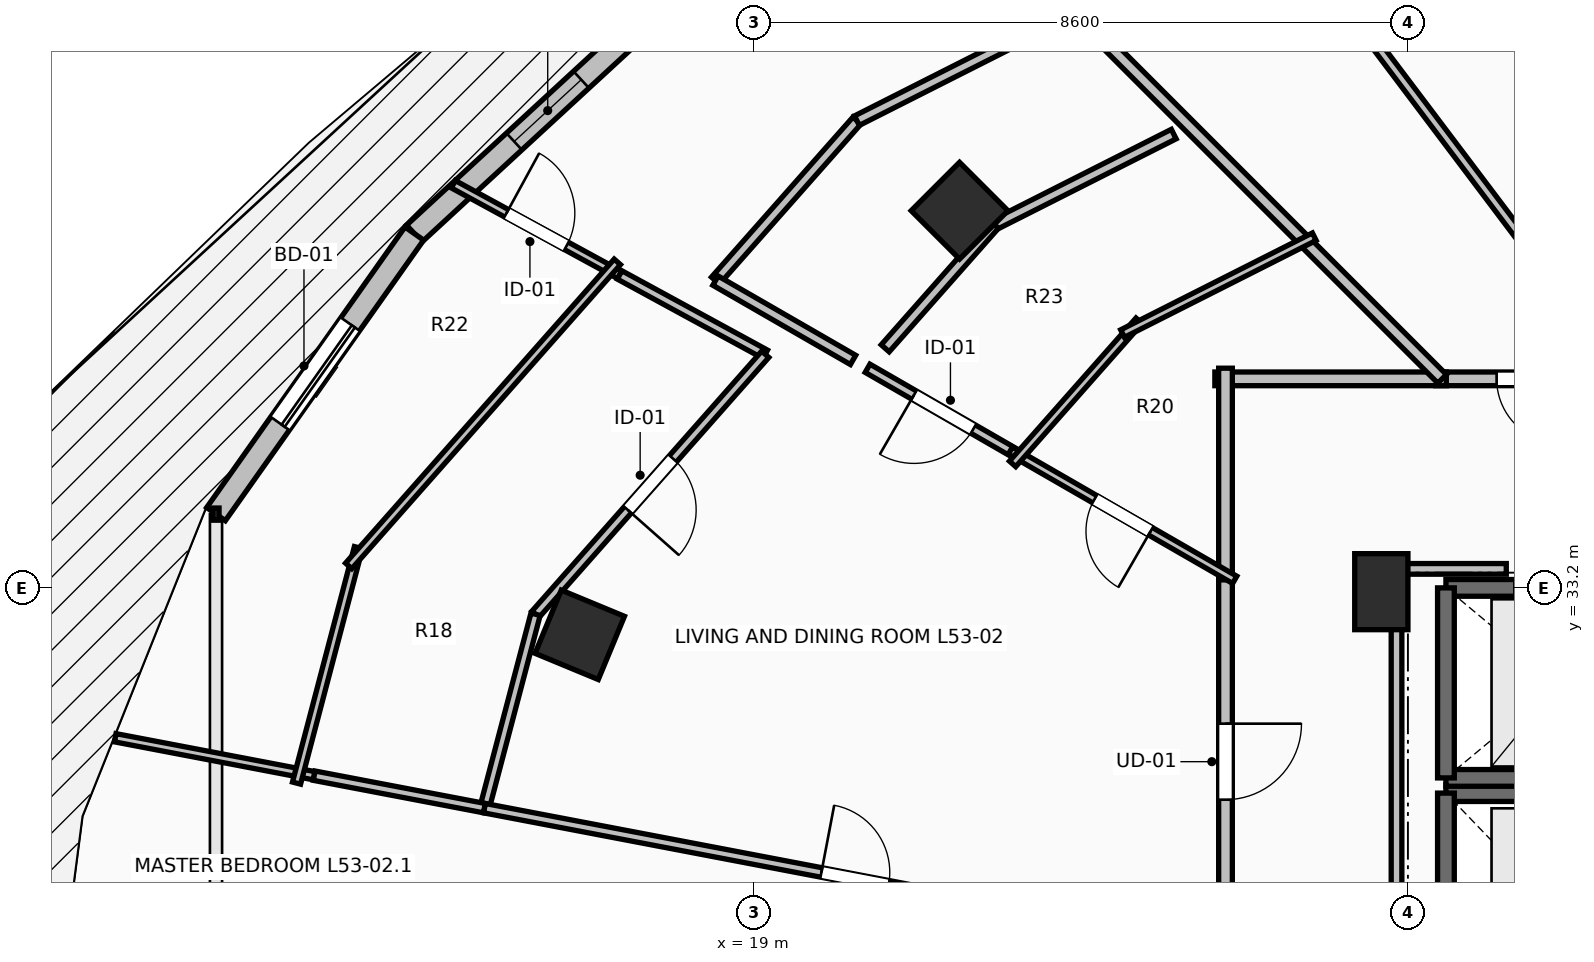
"""IFC4 building model, lengths in metres.
Left out: names, types, materials, properties, quantities, classifications, styles, units other than length and angle.
Written with IfcOpenShell. Run it as: python <this file> out.ifc"""

import sys

from ifc_helpers import new_model, si_unit, direction, frame, frame_2d, origin, origin_2d, place, context, subcontext, project, spatial, rectangle, extrude, element, fill, save


model = new_model("IFC4")
c1 = context("Model", 3, precision=1e-05, world=origin(), true_north=direction((0.0, 1.0)))
c2 = subcontext(c1, "Body", "Model", "MODEL_VIEW")
j1 = project(units=[si_unit("LENGTHUNIT", "METRE"), si_unit("PLANEANGLEUNIT", "RADIAN")], contexts=[c1])
p1 = place(None, origin())
s1 = spatial("IfcSite", under=j1, at=p1, CompositionType="ELEMENT")
p2 = place(p1, origin())
s2 = spatial("IfcBuilding", under=s1, at=p2, CompositionType="ELEMENT")
p3 = place(p2, frame((0.0, 0.0, 196.6)))
s3 = spatial("IfcBuildingStorey", under=s2, at=p3, CompositionType="ELEMENT", Elevation=196.6)
for number, where, z_axis, x_axis in (
    (1, (21.701, 38.162, 0.0), (0.0, 0.0, 1.0), (-0.707, 0.707, 0.0)),
    (2, (16.705, 32.582, 0.0), (0.0, 0.0, 1.0), (-0.924, 0.383, 0.0)),
):
    element("IfcColumn", number, at=place(p3, frame(where, z_axis=z_axis, x_axis=x_axis)), inside=s3, PredefinedType="COLUMN", context=c2, shape_type="SweptSolid", body=[
        extrude(rectangle(XDim=0.9, YDim=0.9, at=origin_2d()), origin(), (0.0, 0.0, 1.0), 3.5),
    ])
p4 = place(p3, frame((27.25, 33.15, 0.0), z_axis=(0.0, 0.0, 1.0), x_axis=(1.0, 0.0, 0.0)))
e3 = element("IfcColumn", 3, at=p4, inside=s3, PredefinedType="PILASTER", context=c2, shape_type="SweptSolid", body=[
    extrude(rectangle(XDim=0.7, YDim=1.0, at=origin_2d()), origin(), (0.0, 0.0, 1.0), 3.5),
])
p5 = place(p3, frame((18.038, 41.097, 0.0), z_axis=(0.0, 0.0, 1.0), x_axis=(-0.735359993374, -0.677676678177, 0.0)))
e4 = element("IfcWall", 4, at=p5, inside=s3, PredefinedType="STANDARD", context=c2, shape_type="SweptSolid", body=[
    extrude(rectangle(XDim=4.774, YDim=0.3, at=frame_2d((2.387, 0.0))), origin(), (0.0, 0.0, 1.0), 3.24),
])
p6 = place(p5, frame((1.787, 0.0, 0.85)))
e5 = element("IfcOpeningElement", 5, at=p6, cuts=e4, PredefinedType="OPENING", context=c2, shape_type="SweptSolid", body=[
    extrude(rectangle(XDim=1.2, YDim=2.1, at=frame_2d((0.6, 1.05))), frame((0.0, 0.165, 0.0), z_axis=(0.0, -1.0, 0.0), x_axis=(1.0, 0.0, 0.0)), (0.0, 0.0, 1.0), 0.33),
])
p7 = place(p3, frame((14.528, 37.861, 0.0), z_axis=(0.0, 0.0, 1.0), x_axis=(-0.577168747264, -0.81662490605, 0.0)))
e6 = element("IfcWall", 6, at=p7, inside=s3, PredefinedType="STANDARD", context=c2, shape_type="SweptSolid", body=[
    extrude(rectangle(XDim=4.52, YDim=0.3, at=frame_2d((2.26, 0.0))), origin(), (0.0, 0.0, 1.0), 3.24),
])
p8 = place(p7, frame((1.46, 0.0, 0.0)))
e7 = element("IfcOpeningElement", 7, at=p8, cuts=e6, PredefinedType="OPENING", context=c2, shape_type="SweptSolid", body=[
    extrude(rectangle(XDim=1.6, YDim=2.3, at=frame_2d((0.8, 1.15))), frame((0.0, 0.165, 0.0), z_axis=(0.0, -1.0, 0.0), x_axis=(1.0, 0.0, 0.0)), (0.0, 0.0, 1.0), 0.33),
])
p9 = place(p3, frame((30.5, 30.5, 0.0), z_axis=(0.0, 0.0, 1.0), x_axis=(-1.0, 0.0, 0.0)))
e8 = element("IfcWall", 8, at=p9, inside=s3, PredefinedType="SHEAR", context=c2, shape_type="SweptSolid", body=[
    extrude(rectangle(XDim=2.4, YDim=0.22, at=frame_2d((1.2, 0.0))), origin(), (0.0, 0.0, 1.0), 3.24),
])
p10 = place(p3, frame((28.1, 30.5, 0.0), z_axis=(0.0, 0.0, 1.0), x_axis=(0.0, -1.0, 0.0)))
e9 = element("IfcWall", 9, at=p10, inside=s3, PredefinedType="SHEAR", context=c2, shape_type="SweptSolid", body=[
    extrude(rectangle(XDim=2.5, YDim=0.22, at=frame_2d((1.25, 0.0))), origin(), (0.0, 0.0, 1.0), 3.24),
])
p11 = place(p3, frame((28.1, 30.7, 0.0), z_axis=(0.0, 0.0, 1.0), x_axis=(1.0, 0.0, 0.0)))
e10 = element("IfcWall", 10, at=p11, inside=s3, PredefinedType="SOLIDWALL", context=c2, shape_type="SweptSolid", body=[
    extrude(rectangle(XDim=3.0, YDim=0.22, at=frame_2d((1.5, 0.0))), origin(), (0.0, 0.0, 1.0), 3.24),
])
p12 = place(p3, frame((31.1, 33.2, 0.0), z_axis=(0.0, 0.0, 1.0), x_axis=(-1.0, 0.0, 0.0)))
e11 = element("IfcWall", 11, at=p12, inside=s3, PredefinedType="SOLIDWALL", context=c2, shape_type="SweptSolid", body=[
    extrude(rectangle(XDim=3.0, YDim=0.22, at=frame_2d((1.5, 0.0))), origin(), (0.0, 0.0, 1.0), 3.24),
])
p13 = place(p12, frame((0.9, 0.0, 0.0)))
e12 = element("IfcOpeningElement", 12, at=p13, cuts=e11, PredefinedType="OPENING", context=c2, shape_type="SweptSolid", body=[
    extrude(rectangle(XDim=1.2, YDim=2.2, at=frame_2d((0.6, 1.1))), frame((0.0, 0.125, 0.0), z_axis=(0.0, -1.0, 0.0), x_axis=(1.0, 0.0, 0.0)), (0.0, 0.0, 1.0), 0.25),
])
p14 = place(p3, frame((28.1, 33.2, 0.0), z_axis=(0.0, 0.0, 1.0), x_axis=(0.0, -1.0, 0.0)))
e13 = element("IfcWall", 13, at=p14, inside=s3, PredefinedType="SOLIDWALL", context=c2, shape_type="SweptSolid", body=[
    extrude(rectangle(XDim=2.5, YDim=0.22, at=frame_2d((1.25, 0.0))), origin(), (0.0, 0.0, 1.0), 3.24),
])
p15 = place(p3, frame((30.419, 35.95, 0.0), z_axis=(0.0, 0.0, 1.0), x_axis=(-1.0, 0.0, 0.0)))
e14 = element("IfcWall", 14, at=p15, inside=s3, PredefinedType="PARTITIONING", context=c2, shape_type="SweptSolid", body=[
    extrude(rectangle(XDim=2.454, YDim=0.18, at=frame_2d((1.227, 0.0))), origin(), (0.0, 0.0, 1.0), 2.432),
])
p16 = place(p15, frame((0.802, 0.0, 0.0)))
e15 = element("IfcOpeningElement", 15, at=p16, cuts=e14, PredefinedType="OPENING", context=c2, shape_type="SweptSolid", body=[
    extrude(rectangle(XDim=0.85, YDim=2.1, at=frame_2d((0.425, 1.05))), frame((0.0, 0.105, 0.0), z_axis=(0.0, -1.0, 0.0), x_axis=(1.0, 0.0, 0.0)), (0.0, 0.0, 1.0), 0.21),
])
p17 = place(p3, frame((25.2, 33.445, 0.0), z_axis=(0.0, 0.0, 1.0), x_axis=(0.0, -1.0, 0.0)))
e16 = element("IfcWall", 16, at=p17, inside=s3, PredefinedType="PARTITIONING", context=c2, shape_type="SweptSolid", body=[
    extrude(rectangle(XDim=5.063, YDim=0.18, at=frame_2d((2.531, 0.0))), origin(), (0.0, 0.0, 1.0), 2.432),
])
p18 = place(p17, frame((2.031, 0.0, 0.0)))
e17 = element("IfcOpeningElement", 17, at=p18, cuts=e16, PredefinedType="OPENING", context=c2, shape_type="SweptSolid", body=[
    extrude(rectangle(XDim=1.0, YDim=2.15, at=frame_2d((0.5, 1.075))), frame((0.0, 0.105, 0.0), z_axis=(0.0, -1.0, 0.0), x_axis=(1.0, 0.0, 0.0)), (0.0, 0.0, 1.0), 0.21),
])
p19 = place(p3, frame((28.105, 35.95, 0.0), z_axis=(0.0, 0.0, 1.0), x_axis=(-1.0, 0.0, 0.0)))
e18 = element("IfcWall", 18, at=p19, inside=s3, PredefinedType="PARTITIONING", context=c2, shape_type="SweptSolid", body=[
    extrude(rectangle(XDim=3.045, YDim=0.18, at=frame_2d((1.522, 0.0))), origin(), (0.0, 0.0, 1.0), 2.432),
])
p20 = place(p3, frame((25.2, 36.09, 0.0), z_axis=(0.0, 0.0, 1.0), x_axis=(0.0, -1.0, 0.0)))
e19 = element("IfcWall", 19, at=p20, inside=s3, PredefinedType="PARTITIONING", context=c2, shape_type="SweptSolid", body=[
    extrude(rectangle(XDim=2.785, YDim=0.18, at=frame_2d((1.393, 0.0))), origin(), (0.0, 0.0, 1.0), 2.432),
])
p21 = place(p3, frame((27.069, 45.673, 0.0), z_axis=(0.0, 0.0, 1.0), x_axis=(0.485717471054, -0.874115860921, 0.0)))
e20 = element("IfcWall", 20, at=p21, inside=s3, PredefinedType="PARTITIONING", context=c2, shape_type="SweptSolid", body=[
    extrude(rectangle(XDim=11.123, YDim=0.125, at=frame_2d((5.562, 0.0))), origin(), (0.0, 0.0, 1.0), 2.432),
])
p22 = place(p3, frame((24.075, 44.46, 0.0), z_axis=(0.0, 0.0, 1.0), x_axis=(0.602185523072, -0.798356183544, 0.0)))
e21 = element("IfcWall", 21, at=p22, inside=s3, PredefinedType="PARTITIONING", context=c2, shape_type="SweptSolid", body=[
    extrude(rectangle(XDim=10.659, YDim=0.125, at=frame_2d((5.33, 0.0))), origin(), (0.0, 0.0, 1.0), 2.432),
])
p23 = place(p3, frame((21.041, 42.959, 0.0), z_axis=(0.0, 0.0, 1.0), x_axis=(0.707106781187, -0.707106781187, 0.0)))
e22 = element("IfcWall", 22, at=p23, inside=s3, PredefinedType="PARTITIONING", context=c2, shape_type="SweptSolid", body=[
    extrude(rectangle(XDim=9.912, YDim=0.16, at=frame_2d((4.956, 0.0))), origin(), (0.0, 0.0, 1.0), 2.432),
])
p24 = place(p3, frame((22.492, 34.936, 0.0), z_axis=(0.0, 0.0, 1.0), x_axis=(-0.866435390844, 0.499289208267, 0.0)))
e23 = element("IfcWall", 23, at=p24, inside=s3, PredefinedType="PARTITIONING", context=c2, shape_type="SweptSolid", body=[
    extrude(rectangle(XDim=2.309, YDim=0.125, at=frame_2d((1.155, 0.0))), origin(), (0.0, 0.0, 1.0), 2.922),
])
p25 = place(p24, frame((0.705, 0.0, 0.0)))
e24 = element("IfcOpeningElement", 24, at=p25, cuts=e23, PredefinedType="OPENING", context=c2, shape_type="SweptSolid", body=[
    extrude(rectangle(XDim=0.9, YDim=2.1, at=frame_2d((0.45, 1.05))), frame((0.0, 0.077, 0.0), z_axis=(0.0, -1.0, 0.0), x_axis=(1.0, 0.0, 0.0)), (0.0, 0.0, 1.0), 0.155),
])
p26 = place(p3, frame((25.321, 33.306, 0.0), z_axis=(0.0, 0.0, 1.0), x_axis=(-0.866517217622, 0.49914718427, 0.0)))
e25 = element("IfcWall", 25, at=p26, inside=s3, PredefinedType="PARTITIONING", context=c2, shape_type="SweptSolid", body=[
    extrude(rectangle(XDim=3.405, YDim=0.11, at=frame_2d((1.703, 0.0))), origin(), (0.0, 0.0, 1.0), 2.922),
])
p27 = place(p26, frame((1.278, 0.0, 0.0)))
e26 = element("IfcOpeningElement", 26, at=p27, cuts=e25, PredefinedType="OPENING", context=c2, shape_type="SweptSolid", body=[
    extrude(rectangle(XDim=0.85, YDim=2.1, at=frame_2d((0.425, 1.05))), frame((0.0, 0.07, 0.0), z_axis=(0.0, -1.0, 0.0), x_axis=(1.0, 0.0, 0.0)), (0.0, 0.0, 1.0), 0.14),
])
p28 = place(p3, frame((15.041, 38.51, 0.0), z_axis=(0.0, 0.0, 1.0), x_axis=(0.877951724479, -0.478749171784, 0.0)))
e27 = element("IfcWall", 27, at=p28, inside=s3, PredefinedType="PARTITIONING", context=c2, shape_type="SweptSolid", body=[
    extrude(rectangle(XDim=2.492, YDim=0.11, at=frame_2d((1.246, 0.0))), origin(), (0.0, 0.0, 1.0), 3.24),
])
p29 = place(p28, frame((0.796, 0.0, 0.0)))
e28 = element("IfcOpeningElement", 28, at=p29, cuts=e27, PredefinedType="OPENING", context=c2, shape_type="SweptSolid", body=[
    extrude(rectangle(XDim=0.9, YDim=2.1, at=frame_2d((0.45, 1.05))), frame((0.0, 0.07, 0.0), z_axis=(0.0, -1.0, 0.0), x_axis=(1.0, 0.0, 0.0)), (0.0, 0.0, 1.0), 0.14),
])
p30 = place(p3, frame((13.21, 30.729, 0.0), z_axis=(0.0, 0.0, 1.0), x_axis=(-0.982266305937, 0.187491077708, 0.0)))
e29 = element("IfcWall", 29, at=p30, inside=s3, PredefinedType="PARTITIONING", context=c2, shape_type="SweptSolid", body=[
    extrude(rectangle(XDim=2.664, YDim=0.11, at=frame_2d((1.332, 0.0))), origin(), (0.0, 0.0, 1.0), 3.24),
])
p31 = place(p3, frame((17.229, 37.317, 0.0), z_axis=(0.0, 0.0, 1.0), x_axis=(0.878117834212, -0.47844442649, 0.0)))
e30 = element("IfcWall", 30, at=p31, inside=s3, PredefinedType="PARTITIONING", context=c2, shape_type="SweptSolid", body=[
    extrude(rectangle(XDim=2.182, YDim=0.125, at=frame_2d((1.091, 0.0))), origin(), (0.0, 0.0, 1.0), 3.24),
])
p32 = place(p3, frame((19.145, 36.273, 0.0), z_axis=(0.0, 0.0, 1.0), x_axis=(-0.662162868769, -0.749359950373, 0.0)))
e31 = element("IfcWall", 31, at=p32, inside=s3, PredefinedType="PARTITIONING", context=c2, shape_type="SweptSolid", body=[
    extrude(rectangle(XDim=4.564, YDim=0.125, at=frame_2d((2.282, 0.0))), origin(), (0.0, 0.0, 1.0), 3.24),
])
p33 = place(p32, frame((1.832, 0.0, 0.0)))
e32 = element("IfcOpeningElement", 32, at=p33, cuts=e31, PredefinedType="OPENING", context=c2, shape_type="SweptSolid", body=[
    extrude(rectangle(XDim=0.9, YDim=2.1, at=frame_2d((0.45, 1.05))), frame((0.0, 0.077, 0.0), z_axis=(0.0, -1.0, 0.0), x_axis=(1.0, 0.0, 0.0)), (0.0, 0.0, 1.0), 0.155),
])
p34 = place(p3, frame((16.123, 32.853, 0.0), z_axis=(0.0, 0.0, 1.0), x_axis=(-0.254775717765, -0.967000172512, 0.0)))
e33 = element("IfcWall", 33, at=p34, inside=s3, PredefinedType="PARTITIONING", context=c2, shape_type="SweptSolid", body=[
    extrude(rectangle(XDim=2.638, YDim=0.125, at=frame_2d((1.319, 0.0))), origin(), (0.0, 0.0, 1.0), 3.24),
])
p35 = place(p3, frame((15.451, 30.302, 0.0), z_axis=(0.0, 0.0, 1.0), x_axis=(-0.982295439063, 0.187338384738, 0.0)))
e34 = element("IfcWall", 34, at=p35, inside=s3, PredefinedType="PARTITIONING", context=c2, shape_type="SweptSolid", body=[
    extrude(rectangle(XDim=2.281, YDim=0.125, at=frame_2d((1.14, 0.0))), origin(), (0.0, 0.0, 1.0), 3.24),
])
p36 = place(p3, frame((15.451, 30.302, 0.0), z_axis=(0.0, 0.0, 1.0), x_axis=(0.982284698783, -0.187394691859, 0.0)))
e35 = element("IfcWall", 35, at=p36, inside=s3, PredefinedType="PARTITIONING", context=c2, shape_type="SweptSolid", body=[
    extrude(rectangle(XDim=9.925, YDim=0.125, at=frame_2d((4.962, 0.0))), origin(), (0.0, 0.0, 1.0), 2.774),
])
p37 = place(p36, frame((4.512, 0.0, 0.0)))
e36 = element("IfcOpeningElement", 36, at=p37, cuts=e35, PredefinedType="OPENING", context=c2, shape_type="SweptSolid", body=[
    extrude(rectangle(XDim=0.9, YDim=2.1, at=frame_2d((0.45, 1.05))), frame((0.0, 0.077, 0.0), z_axis=(0.0, -1.0, 0.0), x_axis=(1.0, 0.0, 0.0)), (0.0, 0.0, 1.0), 0.155),
])
p38 = place(p3, frame((22.399, 34.831, 0.0), z_axis=(0.0, 0.0, 1.0), x_axis=(0.662292938072, 0.749244996099, 0.0)))
e37 = element("IfcWall", 37, at=p38, inside=s3, PredefinedType="PARTITIONING", context=c2, shape_type="SweptSolid", body=[
    extrude(rectangle(XDim=2.513, YDim=0.11, at=frame_2d((1.256, 0.0))), origin(), (0.0, 0.0, 1.0), 2.432),
])
p39 = place(p3, frame((23.846, 36.546, 0.0), z_axis=(0.0, 0.0, 1.0), x_axis=(0.892553076465, 0.450942352959, 0.0)))
e38 = element("IfcWall", 38, at=p39, inside=s3, PredefinedType="PARTITIONING", context=c2, shape_type="SweptSolid", body=[
    extrude(rectangle(XDim=2.826, YDim=0.11, at=frame_2d((1.413, 0.0))), origin(), (0.0, 0.0, 1.0), 2.432),
])
p40 = place(p3, frame((12.979, 30.632, 0.0), z_axis=(0.0, 0.0, 1.0), x_axis=(0.254121849718, 0.967172210879, 0.0)))
e39 = element("IfcWall", 39, at=p40, inside=s3, PredefinedType="PARTITIONING", context=c2, shape_type="SweptSolid", body=[
    extrude(rectangle(XDim=3.203, YDim=0.11, at=frame_2d((1.602, 0.0))), origin(), (0.0, 0.0, 1.0), 3.24),
])
p41 = place(p3, frame((13.664, 33.489, 0.0), z_axis=(0.0, 0.0, 1.0), x_axis=(0.662149418065, 0.74937183571, 0.0)))
e40 = element("IfcWall", 40, at=p41, inside=s3, PredefinedType="PARTITIONING", context=c2, shape_type="SweptSolid", body=[
    extrude(rectangle(XDim=5.338, YDim=0.11, at=frame_2d((2.669, 0.0))), origin(), (0.0, 0.0, 1.0), 3.24),
])
p42 = place(p3, frame((28.894, 33.45, 0.0), z_axis=(0.0, 0.0, 1.0), x_axis=(-1.0, 0.0, 0.0)))
e41 = element("IfcWall", 41, at=p42, inside=s3, PredefinedType="PARTITIONING", context=c2, shape_type="SweptSolid", body=[
    extrude(rectangle(XDim=1.444, YDim=0.14, at=frame_2d((0.722, 0.0))), origin(), (0.0, 0.0, 1.0), 2.432),
])
p43 = place(p3, frame((27.45, 33.45, 0.0), z_axis=(0.0, 0.0, 1.0), x_axis=(0.0, -1.0, 0.0)))
e42 = element("IfcWall", 42, at=p43, inside=s3, PredefinedType="PARTITIONING", context=c2, shape_type="SweptSolid", body=[
    extrude(rectangle(XDim=5.254, YDim=0.14, at=frame_2d((2.627, 0.0))), origin(), (0.0, 0.0, 1.0), 2.432),
])
p44 = place(p3, frame((18.49, 37.242, 0.0), z_axis=(0.0, 0.0, 1.0), x_axis=(0.662371376331, 0.749175653513, 0.0)))
e43 = element("IfcWall", 43, at=p44, inside=s3, PredefinedType="PARTITIONING", context=c2, shape_type="SweptSolid", body=[
    extrude(rectangle(XDim=2.81, YDim=0.14, at=frame_2d((1.405, 0.0))), origin(), (0.0, 0.0, 1.0), 3.24),
])
p45 = place(p3, frame((20.351, 39.347, 0.0), z_axis=(0.0, 0.0, 1.0), x_axis=(0.89244587056, 0.451154483653, 0.0)))
e44 = element("IfcWall", 44, at=p45, inside=s3, PredefinedType="PARTITIONING", context=c2, shape_type="SweptSolid", body=[
    extrude(rectangle(XDim=2.97, YDim=0.14, at=frame_2d((1.485, 0.0))), origin(), (0.0, 0.0, 1.0), 3.24),
])
p46 = place(p3, frame((20.3, 36.199, 0.0), z_axis=(0.0, 0.0, 1.0), x_axis=(-0.86645395742, 0.499256987604, 0.0)))
e45 = element("IfcWall", 45, at=p46, inside=s3, PredefinedType="PARTITIONING", context=c2, shape_type="SweptSolid", body=[
    extrude(rectangle(XDim=2.089, YDim=0.14, at=frame_2d((1.044, 0.0))), origin(), (0.0, 0.0, 1.0), 2.774),
])
p47 = place(p3, frame((24.519, 39.17, 0.0), z_axis=(0.0, 0.0, 1.0), x_axis=(-0.89247840077, -0.451090128643, 0.0)))
e46 = element("IfcWall", 46, at=p47, inside=s3, PredefinedType="PARTITIONING", context=c2, shape_type="SweptSolid", body=[
    extrude(rectangle(XDim=2.642, YDim=0.14, at=frame_2d((1.321, 0.0))), origin(), (0.0, 0.0, 1.0), 2.432),
])
p48 = place(p3, frame((22.161, 37.978, 0.0), z_axis=(0.0, 0.0, 1.0), x_axis=(-0.662476802918, -0.749082429106, 0.0)))
e47 = element("IfcWall", 47, at=p48, inside=s3, PredefinedType="PARTITIONING", context=c2, shape_type="SweptSolid", body=[
    extrude(rectangle(XDim=2.171, YDim=0.14, at=frame_2d((1.085, 0.0))), origin(), (0.0, 0.0, 1.0), 2.432),
])
p49 = place(p8, origin())
e48 = element("IfcDoor", 48, at=p49, inside=s3, OperationType="SLIDING_TO_LEFT", PredefinedType="DOOR", context=c2, shape_type="SweptSolid", body=[
    extrude(rectangle(XDim=1.6, YDim=2.3, at=frame_2d((0.8, 1.15))), frame((0.0, 0.025, 0.0), z_axis=(0.0, -1.0, 0.0), x_axis=(1.0, 0.0, 0.0)), (0.0, 0.0, 1.0), 0.05),
])
fill(e7, e48)
p50 = place(p6, origin())
e49 = element("IfcWindow", 49, at=p50, inside=s3, PartitioningType="SINGLE_PANEL", PredefinedType="WINDOW", context=c2, shape_type="SweptSolid", body=[
    extrude(rectangle(XDim=1.2, YDim=2.1, at=frame_2d((0.6, 1.05))), frame((0.0, 0.03, 0.0), z_axis=(0.0, -1.0, 0.0), x_axis=(1.0, 0.0, 0.0)), (0.0, 0.0, 1.0), 0.06),
])
fill(e5, e49)
p51 = place(p13, origin())
e50 = element("IfcDoor", 50, at=p51, inside=s3, OperationType="SLIDING_TO_LEFT", PredefinedType="DOOR", context=c2, shape_type="SweptSolid", body=[
    extrude(rectangle(XDim=1.2, YDim=2.2, at=frame_2d((0.6, 1.1))), frame((0.0, 0.025, 0.0), z_axis=(0.0, -1.0, 0.0), x_axis=(1.0, 0.0, 0.0)), (0.0, 0.0, 1.0), 0.05),
])
fill(e12, e50)
p52 = place(p18, origin())
e51 = element("IfcDoor", 51, at=p52, inside=s3, OperationType="SINGLE_SWING_LEFT", PredefinedType="DOOR", context=c2, shape_type="SweptSolid", body=[
    extrude(rectangle(XDim=1.0, YDim=2.15, at=frame_2d((0.5, 1.075))), frame((0.0, 0.025, 0.0), z_axis=(0.0, -1.0, 0.0), x_axis=(1.0, 0.0, 0.0)), (0.0, 0.0, 1.0), 0.05),
])
fill(e17, e51)
p53 = place(p25, origin())
e52 = element("IfcDoor", 52, at=p53, inside=s3, OperationType="SINGLE_SWING_RIGHT", PredefinedType="DOOR", context=c2, shape_type="SweptSolid", body=[
    extrude(rectangle(XDim=0.9, YDim=2.1, at=frame_2d((0.45, 1.05))), frame((0.0, 0.025, 0.0), z_axis=(0.0, -1.0, 0.0), x_axis=(1.0, 0.0, 0.0)), (0.0, 0.0, 1.0), 0.05),
])
fill(e24, e52)
p54 = place(p27, origin())
e53 = element("IfcDoor", 53, at=p54, inside=s3, OperationType="SINGLE_SWING_LEFT", PredefinedType="DOOR", context=c2, shape_type="SweptSolid", body=[
    extrude(rectangle(XDim=0.85, YDim=2.1, at=frame_2d((0.425, 1.05))), frame((0.0, 0.025, 0.0), z_axis=(0.0, -1.0, 0.0), x_axis=(1.0, 0.0, 0.0)), (0.0, 0.0, 1.0), 0.05),
])
fill(e26, e53)
p55 = place(p29, origin())
e54 = element("IfcDoor", 54, at=p55, inside=s3, OperationType="SINGLE_SWING_LEFT", PredefinedType="DOOR", context=c2, shape_type="SweptSolid", body=[
    extrude(rectangle(XDim=0.9, YDim=2.1, at=frame_2d((0.45, 1.05))), frame((0.0, 0.025, 0.0), z_axis=(0.0, -1.0, 0.0), x_axis=(1.0, 0.0, 0.0)), (0.0, 0.0, 1.0), 0.05),
])
fill(e28, e54)
p56 = place(p33, origin())
e55 = element("IfcDoor", 55, at=p56, inside=s3, OperationType="SINGLE_SWING_RIGHT", PredefinedType="DOOR", context=c2, shape_type="SweptSolid", body=[
    extrude(rectangle(XDim=0.9, YDim=2.1, at=frame_2d((0.45, 1.05))), frame((0.0, 0.025, 0.0), z_axis=(0.0, -1.0, 0.0), x_axis=(1.0, 0.0, 0.0)), (0.0, 0.0, 1.0), 0.05),
])
fill(e32, e55)
p57 = place(p37, origin())
e56 = element("IfcDoor", 56, at=p57, inside=s3, OperationType="SINGLE_SWING_LEFT", PredefinedType="DOOR", context=c2, shape_type="SweptSolid", body=[
    extrude(rectangle(XDim=0.9, YDim=2.1, at=frame_2d((0.45, 1.05))), frame((0.0, 0.025, 0.0), z_axis=(0.0, -1.0, 0.0), x_axis=(1.0, 0.0, 0.0)), (0.0, 0.0, 1.0), 0.05),
])
fill(e36, e56)
p58 = place(p16, origin())
e57 = element("IfcDoor", 57, at=p58, inside=s3, OperationType="SINGLE_SWING_LEFT", PredefinedType="DOOR", context=c2, shape_type="SweptSolid", body=[
    extrude(rectangle(XDim=0.85, YDim=2.1, at=frame_2d((0.425, 1.05))), frame((0.0, 0.025, 0.0), z_axis=(0.0, -1.0, 0.0), x_axis=(1.0, 0.0, 0.0)), (0.0, 0.0, 1.0), 0.05),
])
fill(e15, e57)
save(model, sys.argv[1])
